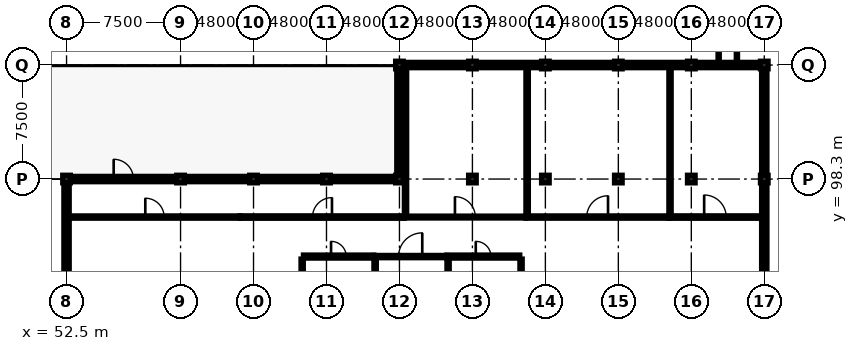
"""IFC4 building model, lengths in metres.
Left out: names, types, materials, properties, quantities, classifications, styles, units other than length and angle.
Written with IfcOpenShell. Run it as: python <this file> out.ifc"""

import sys

from ifc_helpers import new_model, si_unit, direction, frame, frame_2d, origin, origin_2d, place, context, subcontext, project, spatial, rectangle, extrude, element, fill, save


model = new_model("IFC4")
c1 = context("Model", 3, precision=1e-05, world=origin(), true_north=direction((0.0, 1.0)))
c2 = subcontext(c1, "Body", "Model", "MODEL_VIEW")
j1 = project(units=[si_unit("LENGTHUNIT", "METRE"), si_unit("PLANEANGLEUNIT", "RADIAN")], contexts=[c1])
p1 = place(None, origin())
s1 = spatial("IfcSite", under=j1, at=p1, CompositionType="ELEMENT")
p2 = place(p1, origin())
s2 = spatial("IfcBuilding", under=s1, at=p2, CompositionType="ELEMENT")
p3 = place(p2, frame((0.0, 0.0, 13.5)))
s3 = spatial("IfcBuildingStorey", under=s2, at=p3, CompositionType="ELEMENT", Elevation=13.5)
for number, where, z_axis, x_axis in (
    (1, (52.5, 98.3, 0.0), (0.0, 0.0, 1.0), (1.0, 0.0, 0.0)),
    (2, (60.0, 98.3, 0.0), (0.0, 0.0, 1.0), (1.0, 0.0, 0.0)),
    (3, (64.8, 98.3, 0.0), (0.0, 0.0, 1.0), (1.0, 0.0, 0.0)),
    (4, (69.6, 98.3, 0.0), (0.0, 0.0, 1.0), (1.0, 0.0, 0.0)),
):
    element("IfcColumn", number, at=place(p3, frame(where, z_axis=z_axis, x_axis=x_axis)), inside=s3, PredefinedType="COLUMN", context=c2, shape_type="SweptSolid", body=[
        extrude(rectangle(XDim=0.5, YDim=0.5, at=origin_2d()), origin(), (0.0, 0.0, 1.0), 5.029),
    ])
for number, where, z_axis, x_axis in (
    (5, (74.4, 98.3, 0.0), (0.0, 0.0, 1.0), (1.0, 0.0, 0.0)),
    (6, (74.4, 105.8, 0.0), (0.0, 0.0, 1.0), (1.0, 0.0, 0.0)),
    (7, (79.2, 98.3, 0.0), (0.0, 0.0, 1.0), (1.0, 0.0, 0.0)),
    (8, (79.2, 105.8, 0.0), (0.0, 0.0, 1.0), (1.0, 0.0, 0.0)),
    (9, (84.0, 98.3, 0.0), (0.0, 0.0, 1.0), (1.0, 0.0, 0.0)),
    (10, (84.0, 105.8, 0.0), (0.0, 0.0, 1.0), (1.0, 0.0, 0.0)),
    (11, (88.8, 98.3, 0.0), (0.0, 0.0, 1.0), (1.0, 0.0, 0.0)),
    (12, (88.8, 105.8, 0.0), (0.0, 0.0, 1.0), (1.0, 0.0, 0.0)),
    (13, (93.6, 98.3, 0.0), (0.0, 0.0, 1.0), (1.0, 0.0, 0.0)),
    (14, (93.6, 105.8, 0.0), (0.0, 0.0, 1.0), (1.0, 0.0, 0.0)),
    (15, (98.4, 98.3, 0.0), (0.0, 0.0, 1.0), (1.0, 0.0, 0.0)),
    (16, (98.4, 105.8, 0.0), (0.0, 0.0, 1.0), (1.0, 0.0, 0.0)),
):
    element("IfcColumn", number, at=place(p3, frame(where, z_axis=z_axis, x_axis=x_axis)), inside=s3, PredefinedType="COLUMN", context=c2, shape_type="SweptSolid", body=[
        extrude(rectangle(XDim=0.5, YDim=0.5, at=origin_2d()), origin(), (0.0, 0.0, 1.0), 3.8),
    ])
for number, where, z_axis, x_axis in (
    (17, (74.65, 105.8, 0.0), (0.0, 0.0, 1.0), (1.0, 0.0, 0.0)),
    (18, (79.45, 105.8, 0.0), (0.0, 0.0, 1.0), (1.0, 0.0, 0.0)),
):
    element("IfcWall", number, at=place(p3, frame(where, z_axis=z_axis, x_axis=x_axis)), inside=s3, PredefinedType="SOLIDWALL", context=c2, shape_type="SweptSolid", body=[
        extrude(rectangle(XDim=4.3, YDim=0.35, at=frame_2d((2.15, 0.0))), origin(), (0.0, 0.0, 1.0), 3.7),
    ])
p4 = place(p3, frame((84.25, 105.8, 0.0), z_axis=(0.0, 0.0, 1.0), x_axis=(1.0, 0.0, 0.0)))
e19 = element("IfcWall", 19, at=p4, inside=s3, PredefinedType="SOLIDWALL", context=c2, shape_type="SweptSolid", body=[
    extrude(rectangle(XDim=4.3, YDim=0.35, at=frame_2d((2.15, 0.0))), origin(), (0.0, 0.0, 1.0), 3.7),
])
p5 = place(p4, frame((1.25, 0.0, 0.9)))
e20 = element("IfcOpeningElement", 20, at=p5, cuts=e19, PredefinedType="OPENING", context=c2, shape_type="SweptSolid", body=[
    extrude(rectangle(XDim=1.8, YDim=1.9, at=frame_2d((0.9, 0.95))), frame((0.0, 0.187, 0.0), z_axis=(0.0, -1.0, 0.0), x_axis=(1.0, 0.0, 0.0)), (0.0, 0.0, 1.0), 0.374),
])
p6 = place(p3, frame((89.05, 105.8, 0.0), z_axis=(0.0, 0.0, 1.0), x_axis=(1.0, 0.0, 0.0)))
e21 = element("IfcWall", 21, at=p6, inside=s3, PredefinedType="SOLIDWALL", context=c2, shape_type="SweptSolid", body=[
    extrude(rectangle(XDim=4.3, YDim=0.35, at=frame_2d((2.15, 0.0))), origin(), (0.0, 0.0, 1.0), 3.7),
])
p7 = place(p3, frame((93.85, 105.8, 0.0), z_axis=(0.0, 0.0, 1.0), x_axis=(1.0, 0.0, 0.0)))
e22 = element("IfcWall", 22, at=p7, inside=s3, PredefinedType="SOLIDWALL", context=c2, shape_type="SweptSolid", body=[
    extrude(rectangle(XDim=4.3, YDim=0.35, at=frame_2d((2.15, 0.0))), origin(), (0.0, 0.0, 1.0), 3.7),
])
p8 = place(p7, frame((1.15, 0.0, 0.9)))
e23 = element("IfcOpeningElement", 23, at=p8, cuts=e22, PredefinedType="OPENING", context=c2, shape_type="SweptSolid", body=[
    extrude(rectangle(XDim=2.0, YDim=1.3, at=frame_2d((1.0, 0.65))), frame((0.0, 0.187, 0.0), z_axis=(0.0, -1.0, 0.0), x_axis=(1.0, 0.0, 0.0)), (0.0, 0.0, 1.0), 0.374),
])
p9 = place(p3, frame((98.4, 105.55, 0.0), z_axis=(0.0, 0.0, 1.0), x_axis=(0.0, -1.0, 0.0)))
e24 = element("IfcWall", 24, at=p9, inside=s3, PredefinedType="SOLIDWALL", context=c2, shape_type="SweptSolid", body=[
    extrude(rectangle(XDim=7.0, YDim=0.35, at=frame_2d((3.5, 0.0))), origin(), (0.0, 0.0, 1.0), 3.7),
])
p10 = place(p9, frame((2.5, 0.0, 0.9)))
e25 = element("IfcOpeningElement", 25, at=p10, cuts=e24, PredefinedType="OPENING", context=c2, shape_type="SweptSolid", body=[
    extrude(rectangle(XDim=2.0, YDim=1.5, at=frame_2d((1.0, 0.75))), frame((0.0, 0.187, 0.0), z_axis=(0.0, -1.0, 0.0), x_axis=(1.0, 0.0, 0.0)), (0.0, 0.0, 1.0), 0.374),
])
for number, where, z_axis, x_axis in (
    (26, (98.4, 98.05, 0.0), (0.0, 0.0, 1.0), (0.0, -1.0, 0.0)),
    (27, (52.5, 91.05, 0.0), (0.0, 0.0, 1.0), (0.0, 1.0, 0.0)),
):
    element("IfcWall", number, at=place(p3, frame(where, z_axis=z_axis, x_axis=x_axis)), inside=s3, PredefinedType="SOLIDWALL", context=c2, shape_type="SweptSolid", body=[
        extrude(rectangle(XDim=7.0, YDim=0.35, at=frame_2d((3.5, 0.0))), origin(), (0.0, 0.0, 1.0), 3.7),
    ])
p11 = place(p3, frame((52.75, 98.3, 0.0), z_axis=(0.0, 0.0, 1.0), x_axis=(1.0, 0.0, 0.0)))
e28 = element("IfcWall", 28, at=p11, inside=s3, PredefinedType="SOLIDWALL", context=c2, shape_type="SweptSolid", body=[
    extrude(rectangle(XDim=7.0, YDim=0.35, at=frame_2d((3.5, 0.0))), origin(), (0.0, 0.0, 1.0), 3.7),
])
p12 = place(p11, frame((2.85, 0.0, 0.0)))
e29 = element("IfcOpeningElement", 29, at=p12, cuts=e28, PredefinedType="OPENING", context=c2, shape_type="SweptSolid", body=[
    extrude(rectangle(XDim=1.3, YDim=2.2, at=frame_2d((0.65, 1.1))), frame((0.0, 0.187, 0.0), z_axis=(0.0, -1.0, 0.0), x_axis=(1.0, 0.0, 0.0)), (0.0, 0.0, 1.0), 0.374),
])
p13 = place(p3, frame((60.25, 98.3, 0.0), z_axis=(0.0, 0.0, 1.0), x_axis=(1.0, 0.0, 0.0)))
e30 = element("IfcWall", 30, at=p13, inside=s3, PredefinedType="SOLIDWALL", context=c2, shape_type="SweptSolid", body=[
    extrude(rectangle(XDim=4.3, YDim=0.35, at=frame_2d((2.15, 0.0))), origin(), (0.0, 0.0, 1.0), 3.7),
])
p14 = place(p13, frame((0.95, 0.0, 0.9)))
e31 = element("IfcOpeningElement", 31, at=p14, cuts=e30, PredefinedType="OPENING", context=c2, shape_type="SweptSolid", body=[
    extrude(rectangle(XDim=2.4, YDim=1.5, at=frame_2d((1.2, 0.75))), frame((0.0, 0.187, 0.0), z_axis=(0.0, -1.0, 0.0), x_axis=(1.0, 0.0, 0.0)), (0.0, 0.0, 1.0), 0.374),
])
p15 = place(p3, frame((65.05, 98.3, 0.0), z_axis=(0.0, 0.0, 1.0), x_axis=(1.0, 0.0, 0.0)))
e32 = element("IfcWall", 32, at=p15, inside=s3, PredefinedType="SOLIDWALL", context=c2, shape_type="SweptSolid", body=[
    extrude(rectangle(XDim=4.3, YDim=0.35, at=frame_2d((2.15, 0.0))), origin(), (0.0, 0.0, 1.0), 3.7),
])
p16 = place(p15, frame((0.95, 0.0, 0.9)))
e33 = element("IfcOpeningElement", 33, at=p16, cuts=e32, PredefinedType="OPENING", context=c2, shape_type="SweptSolid", body=[
    extrude(rectangle(XDim=2.4, YDim=1.7, at=frame_2d((1.2, 0.85))), frame((0.0, 0.187, 0.0), z_axis=(0.0, -1.0, 0.0), x_axis=(1.0, 0.0, 0.0)), (0.0, 0.0, 1.0), 0.374),
])
p17 = place(p3, frame((69.85, 98.3, 0.0), z_axis=(0.0, 0.0, 1.0), x_axis=(1.0, 0.0, 0.0)))
e34 = element("IfcWall", 34, at=p17, inside=s3, PredefinedType="SOLIDWALL", context=c2, shape_type="SweptSolid", body=[
    extrude(rectangle(XDim=4.3, YDim=0.35, at=frame_2d((2.15, 0.0))), origin(), (0.0, 0.0, 1.0), 3.7),
])
p18 = place(p17, frame((0.95, 0.0, 0.9)))
e35 = element("IfcOpeningElement", 35, at=p18, cuts=e34, PredefinedType="OPENING", context=c2, shape_type="SweptSolid", body=[
    extrude(rectangle(XDim=2.4, YDim=1.9, at=frame_2d((1.2, 0.95))), frame((0.0, 0.187, 0.0), z_axis=(0.0, -1.0, 0.0), x_axis=(1.0, 0.0, 0.0)), (0.0, 0.0, 1.0), 0.374),
])
p19 = place(p3, frame((74.4, 98.55, 0.0), z_axis=(0.0, 0.0, 1.0), x_axis=(0.0, 1.0, 0.0)))
e36 = element("IfcWall", 36, at=p19, inside=s3, PredefinedType="SOLIDWALL", context=c2, shape_type="SweptSolid", body=[
    extrude(rectangle(XDim=7.0, YDim=0.35, at=frame_2d((3.5, 0.0))), origin(), (0.0, 0.0, 1.0), 3.7),
])
p20 = place(p3, frame((52.687, 95.8, 0.0), z_axis=(0.0, 0.0, 1.0), x_axis=(1.0, 0.0, 0.0)))
e37 = element("IfcWall", 37, at=p20, inside=s3, PredefinedType="PARTITIONING", context=c2, shape_type="SweptSolid", body=[
    extrude(rectangle(XDim=11.228, YDim=0.15, at=frame_2d((5.614, 0.0))), origin(), (0.0, 0.0, 1.0), 3.7),
])
p21 = place(p20, frame((4.994, 0.0, 0.0)))
e38 = element("IfcOpeningElement", 38, at=p21, cuts=e37, PredefinedType="OPENING", context=c2, shape_type="SweptSolid", body=[
    extrude(rectangle(XDim=1.24, YDim=2.2, at=frame_2d((0.62, 1.1))), frame((0.0, 0.087, 0.0), z_axis=(0.0, -1.0, 0.0), x_axis=(1.0, 0.0, 0.0)), (0.0, 0.0, 1.0), 0.174),
])
p22 = place(p3, frame((63.927, 95.8, 0.0), z_axis=(0.0, 0.0, 1.0), x_axis=(1.0, 0.0, 0.0)))
e39 = element("IfcWall", 39, at=p22, inside=s3, PredefinedType="PARTITIONING", context=c2, shape_type="SweptSolid", body=[
    extrude(rectangle(XDim=10.788, YDim=0.16, at=frame_2d((5.394, 0.0))), origin(), (0.0, 0.0, 1.0), 3.7),
])
p23 = place(p22, frame((4.754, 0.0, 0.0)))
e40 = element("IfcOpeningElement", 40, at=p23, cuts=e39, PredefinedType="OPENING", context=c2, shape_type="SweptSolid", body=[
    extrude(rectangle(XDim=1.28, YDim=2.22, at=frame_2d((0.64, 1.11))), frame((0.0, 0.092, 0.0), z_axis=(0.0, -1.0, 0.0), x_axis=(1.0, 0.0, 0.0)), (0.0, 0.0, 1.0), 0.184),
])
p24 = place(p3, frame((74.727, 95.8, 0.0), z_axis=(0.0, 0.0, 1.0), x_axis=(1.0, 0.0, 0.0)))
e41 = element("IfcWall", 41, at=p24, inside=s3, PredefinedType="PARTITIONING", context=c2, shape_type="SweptSolid", body=[
    extrude(rectangle(XDim=7.988, YDim=0.125, at=frame_2d((3.994, 0.0))), origin(), (0.0, 0.0, 1.0), 3.7),
])
p25 = place(p24, frame((3.324, 0.0, 0.0)))
e42 = element("IfcOpeningElement", 42, at=p25, cuts=e41, PredefinedType="OPENING", context=c2, shape_type="SweptSolid", body=[
    extrude(rectangle(XDim=1.34, YDim=2.24, at=frame_2d((0.67, 1.12))), frame((0.0, 0.074, 0.0), z_axis=(0.0, -1.0, 0.0), x_axis=(1.0, 0.0, 0.0)), (0.0, 0.0, 1.0), 0.149),
])
p26 = place(p3, frame((82.727, 95.8, 0.0), z_axis=(0.0, 0.0, 1.0), x_axis=(1.0, 0.0, 0.0)))
e43 = element("IfcWall", 43, at=p26, inside=s3, PredefinedType="PARTITIONING", context=c2, shape_type="SweptSolid", body=[
    extrude(rectangle(XDim=9.388, YDim=0.15, at=frame_2d((4.694, 0.0))), origin(), (0.0, 0.0, 1.0), 3.7),
])
p27 = place(p26, frame((3.994, 0.0, 0.0)))
e44 = element("IfcOpeningElement", 44, at=p27, cuts=e43, PredefinedType="OPENING", context=c2, shape_type="SweptSolid", body=[
    extrude(rectangle(XDim=1.4, YDim=2.25, at=frame_2d((0.7, 1.125))), frame((0.0, 0.087, 0.0), z_axis=(0.0, -1.0, 0.0), x_axis=(1.0, 0.0, 0.0)), (0.0, 0.0, 1.0), 0.174),
])
p28 = place(p3, frame((92.127, 95.8, 0.0), z_axis=(0.0, 0.0, 1.0), x_axis=(1.0, 0.0, 0.0)))
e45 = element("IfcWall", 45, at=p28, inside=s3, PredefinedType="PARTITIONING", context=c2, shape_type="SweptSolid", body=[
    extrude(rectangle(XDim=6.086, YDim=0.16, at=frame_2d((3.043, 0.0))), origin(), (0.0, 0.0, 1.0), 3.7),
])
p29 = place(p28, frame((2.318, 0.0, 0.0)))
e46 = element("IfcOpeningElement", 46, at=p29, cuts=e45, PredefinedType="OPENING", context=c2, shape_type="SweptSolid", body=[
    extrude(rectangle(XDim=1.45, YDim=2.26, at=frame_2d((0.725, 1.13))), frame((0.0, 0.092, 0.0), z_axis=(0.0, -1.0, 0.0), x_axis=(1.0, 0.0, 0.0)), (0.0, 0.0, 1.0), 0.184),
])
p30 = place(p3, frame((68.085, 93.2, 0.0), z_axis=(0.0, 0.0, 1.0), x_axis=(1.0, 0.0, 0.0)))
e47 = element("IfcWall", 47, at=p30, inside=s3, PredefinedType="PARTITIONING", context=c2, shape_type="SweptSolid", body=[
    extrude(rectangle(XDim=4.63, YDim=0.2, at=frame_2d((2.315, 0.0))), origin(), (0.0, 0.0, 1.0), 3.7),
])
p31 = place(p30, frame((1.815, 0.0, 0.0)))
e48 = element("IfcOpeningElement", 48, at=p31, cuts=e47, PredefinedType="OPENING", context=c2, shape_type="SweptSolid", body=[
    extrude(rectangle(XDim=1.0, YDim=2.15, at=frame_2d((0.5, 1.075))), frame((0.0, 0.112, 0.0), z_axis=(0.0, -1.0, 0.0), x_axis=(1.0, 0.0, 0.0)), (0.0, 0.0, 1.0), 0.224),
])
p32 = place(p3, frame((72.727, 93.2, 0.0), z_axis=(0.0, 0.0, 1.0), x_axis=(1.0, 0.0, 0.0)))
e49 = element("IfcWall", 49, at=p32, inside=s3, PredefinedType="PARTITIONING", context=c2, shape_type="SweptSolid", body=[
    extrude(rectangle(XDim=4.788, YDim=0.15, at=frame_2d((2.394, 0.0))), origin(), (0.0, 0.0, 1.0), 3.7),
])
p33 = place(p32, frame((1.614, 0.0, 0.0)))
e50 = element("IfcOpeningElement", 50, at=p33, cuts=e49, PredefinedType="OPENING", context=c2, shape_type="SweptSolid", body=[
    extrude(rectangle(XDim=1.56, YDim=2.3, at=frame_2d((0.78, 1.15))), frame((0.0, 0.087, 0.0), z_axis=(0.0, -1.0, 0.0), x_axis=(1.0, 0.0, 0.0)), (0.0, 0.0, 1.0), 0.174),
])
p34 = place(p3, frame((77.527, 93.2, 0.0), z_axis=(0.0, 0.0, 1.0), x_axis=(1.0, 0.0, 0.0)))
e51 = element("IfcWall", 51, at=p34, inside=s3, PredefinedType="PARTITIONING", context=c2, shape_type="SweptSolid", body=[
    extrude(rectangle(XDim=4.788, YDim=0.2, at=frame_2d((2.394, 0.0))), origin(), (0.0, 0.0, 1.0), 3.7),
])
p35 = place(p34, frame((1.894, 0.0, 0.0)))
e52 = element("IfcOpeningElement", 52, at=p35, cuts=e51, PredefinedType="OPENING", context=c2, shape_type="SweptSolid", body=[
    extrude(rectangle(XDim=1.0, YDim=2.15, at=frame_2d((0.5, 1.075))), frame((0.0, 0.112, 0.0), z_axis=(0.0, -1.0, 0.0), x_axis=(1.0, 0.0, 0.0)), (0.0, 0.0, 1.0), 0.224),
])
p36 = place(p3, frame((74.8, 95.875, 0.0), z_axis=(0.0, 0.0, 1.0), x_axis=(0.0, 1.0, 0.0)))
e53 = element("IfcWall", 53, at=p36, inside=s3, PredefinedType="PARTITIONING", context=c2, shape_type="SweptSolid", body=[
    extrude(rectangle(XDim=9.739, YDim=0.15, at=frame_2d((4.869, 0.0))), origin(), (0.0, 0.0, 1.0), 3.7),
])
p37 = place(p3, frame((82.8, 95.887, 0.0), z_axis=(0.0, 0.0, 1.0), x_axis=(0.0, 1.0, 0.0)))
e54 = element("IfcWall", 54, at=p37, inside=s3, PredefinedType="PARTITIONING", context=c2, shape_type="SweptSolid", body=[
    extrude(rectangle(XDim=9.726, YDim=0.16, at=frame_2d((4.863, 0.0))), origin(), (0.0, 0.0, 1.0), 3.7),
])
p38 = place(p3, frame((92.2, 95.892, 0.0), z_axis=(0.0, 0.0, 1.0), x_axis=(0.0, 1.0, 0.0)))
e55 = element("IfcWall", 55, at=p38, inside=s3, PredefinedType="PARTITIONING", context=c2, shape_type="SweptSolid", body=[
    extrude(rectangle(XDim=9.721, YDim=0.15, at=frame_2d((4.86, 0.0))), origin(), (0.0, 0.0, 1.0), 3.7),
])
p39 = place(p3, frame((68.0, 83.487, 0.0), z_axis=(0.0, 0.0, 1.0), x_axis=(0.0, 1.0, 0.0)))
e56 = element("IfcWall", 56, at=p39, inside=s3, PredefinedType="PARTITIONING", context=c2, shape_type="SweptSolid", body=[
    extrude(rectangle(XDim=9.548, YDim=0.15, at=frame_2d((4.774, 0.0))), origin(), (0.0, 0.0, 1.0), 3.7),
])
p40 = place(p3, frame((72.8, 83.487, 0.0), z_axis=(0.0, 0.0, 1.0), x_axis=(0.0, 1.0, 0.0)))
e57 = element("IfcWall", 57, at=p40, inside=s3, PredefinedType="PARTITIONING", context=c2, shape_type="SweptSolid", body=[
    extrude(rectangle(XDim=9.626, YDim=0.16, at=frame_2d((4.813, 0.0))), origin(), (0.0, 0.0, 1.0), 3.7),
])
p41 = place(p3, frame((77.6, 83.487, 0.0), z_axis=(0.0, 0.0, 1.0), x_axis=(0.0, 1.0, 0.0)))
e58 = element("IfcWall", 58, at=p41, inside=s3, PredefinedType="PARTITIONING", context=c2, shape_type="SweptSolid", body=[
    extrude(rectangle(XDim=9.621, YDim=0.15, at=frame_2d((4.811, 0.0))), origin(), (0.0, 0.0, 1.0), 3.7),
])
p42 = place(p3, frame((82.4, 83.487, 0.0), z_axis=(0.0, 0.0, 1.0), x_axis=(0.0, 1.0, 0.0)))
e59 = element("IfcWall", 59, at=p42, inside=s3, PredefinedType="PARTITIONING", context=c2, shape_type="SweptSolid", body=[
    extrude(rectangle(XDim=9.548, YDim=0.15, at=frame_2d((4.774, 0.0))), origin(), (0.0, 0.0, 1.0), 3.7),
])
p43 = place(p5, origin())
e60 = element("IfcWindow", 60, at=p43, inside=s3, PartitioningType="DOUBLE_PANEL_VERTICAL", PredefinedType="WINDOW", context=c2, shape_type="SweptSolid", body=[
    extrude(rectangle(XDim=1.8, YDim=1.9, at=frame_2d((0.9, 0.95))), frame((0.0, 0.03, 0.0), z_axis=(0.0, -1.0, 0.0), x_axis=(1.0, 0.0, 0.0)), (0.0, 0.0, 1.0), 0.06),
])
fill(e20, e60)
p44 = place(p8, origin())
e61 = element("IfcWindow", 61, at=p44, inside=s3, PartitioningType="DOUBLE_PANEL_VERTICAL", PredefinedType="WINDOW", context=c2, shape_type="SweptSolid", body=[
    extrude(rectangle(XDim=2.0, YDim=1.3, at=frame_2d((1.0, 0.65))), frame((0.0, 0.03, 0.0), z_axis=(0.0, -1.0, 0.0), x_axis=(1.0, 0.0, 0.0)), (0.0, 0.0, 1.0), 0.06),
])
fill(e23, e61)
p45 = place(p10, origin())
e62 = element("IfcWindow", 62, at=p45, inside=s3, PartitioningType="DOUBLE_PANEL_VERTICAL", PredefinedType="WINDOW", context=c2, shape_type="SweptSolid", body=[
    extrude(rectangle(XDim=2.0, YDim=1.5, at=frame_2d((1.0, 0.75))), frame((0.0, 0.03, 0.0), z_axis=(0.0, -1.0, 0.0), x_axis=(1.0, 0.0, 0.0)), (0.0, 0.0, 1.0), 0.06),
])
fill(e25, e62)
p46 = place(p12, origin())
e63 = element("IfcDoor", 63, at=p46, inside=s3, OperationType="SINGLE_SWING_LEFT", PredefinedType="DOOR", context=c2, shape_type="SweptSolid", body=[
    extrude(rectangle(XDim=1.3, YDim=2.2, at=frame_2d((0.65, 1.1))), frame((0.0, 0.025, 0.0), z_axis=(0.0, -1.0, 0.0), x_axis=(1.0, 0.0, 0.0)), (0.0, 0.0, 1.0), 0.05),
])
fill(e29, e63)
p47 = place(p14, origin())
e64 = element("IfcWindow", 64, at=p47, inside=s3, PartitioningType="DOUBLE_PANEL_VERTICAL", PredefinedType="WINDOW", context=c2, shape_type="SweptSolid", body=[
    extrude(rectangle(XDim=2.4, YDim=1.5, at=frame_2d((1.2, 0.75))), frame((0.0, 0.03, 0.0), z_axis=(0.0, -1.0, 0.0), x_axis=(1.0, 0.0, 0.0)), (0.0, 0.0, 1.0), 0.06),
])
fill(e31, e64)
p48 = place(p16, origin())
e65 = element("IfcWindow", 65, at=p48, inside=s3, PartitioningType="DOUBLE_PANEL_VERTICAL", PredefinedType="WINDOW", context=c2, shape_type="SweptSolid", body=[
    extrude(rectangle(XDim=2.4, YDim=1.7, at=frame_2d((1.2, 0.85))), frame((0.0, 0.03, 0.0), z_axis=(0.0, -1.0, 0.0), x_axis=(1.0, 0.0, 0.0)), (0.0, 0.0, 1.0), 0.06),
])
fill(e33, e65)
p49 = place(p18, origin())
e66 = element("IfcWindow", 66, at=p49, inside=s3, PartitioningType="DOUBLE_PANEL_VERTICAL", PredefinedType="WINDOW", context=c2, shape_type="SweptSolid", body=[
    extrude(rectangle(XDim=2.4, YDim=1.9, at=frame_2d((1.2, 0.95))), frame((0.0, 0.03, 0.0), z_axis=(0.0, -1.0, 0.0), x_axis=(1.0, 0.0, 0.0)), (0.0, 0.0, 1.0), 0.06),
])
fill(e35, e66)
p50 = place(p21, origin())
e67 = element("IfcDoor", 67, at=p50, inside=s3, OperationType="SINGLE_SWING_LEFT", PredefinedType="DOOR", context=c2, shape_type="SweptSolid", body=[
    extrude(rectangle(XDim=1.24, YDim=2.2, at=frame_2d((0.62, 1.1))), frame((0.0, 0.025, 0.0), z_axis=(0.0, -1.0, 0.0), x_axis=(1.0, 0.0, 0.0)), (0.0, 0.0, 1.0), 0.05),
])
fill(e38, e67)
p51 = place(p23, origin())
e68 = element("IfcDoor", 68, at=p51, inside=s3, OperationType="SINGLE_SWING_RIGHT", PredefinedType="DOOR", context=c2, shape_type="SweptSolid", body=[
    extrude(rectangle(XDim=1.28, YDim=2.22, at=frame_2d((0.64, 1.11))), frame((0.0, 0.025, 0.0), z_axis=(0.0, -1.0, 0.0), x_axis=(1.0, 0.0, 0.0)), (0.0, 0.0, 1.0), 0.05),
])
fill(e40, e68)
p52 = place(p25, origin())
e69 = element("IfcDoor", 69, at=p52, inside=s3, OperationType="SINGLE_SWING_LEFT", PredefinedType="DOOR", context=c2, shape_type="SweptSolid", body=[
    extrude(rectangle(XDim=1.34, YDim=2.24, at=frame_2d((0.67, 1.12))), frame((0.0, 0.025, 0.0), z_axis=(0.0, -1.0, 0.0), x_axis=(1.0, 0.0, 0.0)), (0.0, 0.0, 1.0), 0.05),
])
fill(e42, e69)
p53 = place(p27, origin())
e70 = element("IfcDoor", 70, at=p53, inside=s3, OperationType="SINGLE_SWING_RIGHT", PredefinedType="DOOR", context=c2, shape_type="SweptSolid", body=[
    extrude(rectangle(XDim=1.4, YDim=2.25, at=frame_2d((0.7, 1.125))), frame((0.0, 0.025, 0.0), z_axis=(0.0, -1.0, 0.0), x_axis=(1.0, 0.0, 0.0)), (0.0, 0.0, 1.0), 0.05),
])
fill(e44, e70)
p54 = place(p29, origin())
e71 = element("IfcDoor", 71, at=p54, inside=s3, OperationType="SINGLE_SWING_LEFT", PredefinedType="DOOR", context=c2, shape_type="SweptSolid", body=[
    extrude(rectangle(XDim=1.45, YDim=2.26, at=frame_2d((0.725, 1.13))), frame((0.0, 0.025, 0.0), z_axis=(0.0, -1.0, 0.0), x_axis=(1.0, 0.0, 0.0)), (0.0, 0.0, 1.0), 0.05),
])
fill(e46, e71)
p55 = place(p31, origin())
e72 = element("IfcDoor", 72, at=p55, inside=s3, OperationType="SINGLE_SWING_LEFT", PredefinedType="DOOR", context=c2, shape_type="SweptSolid", body=[
    extrude(rectangle(XDim=1.0, YDim=2.15, at=frame_2d((0.5, 1.075))), frame((0.0, 0.025, 0.0), z_axis=(0.0, -1.0, 0.0), x_axis=(1.0, 0.0, 0.0)), (0.0, 0.0, 1.0), 0.05),
])
fill(e48, e72)
p56 = place(p33, origin())
e73 = element("IfcDoor", 73, at=p56, inside=s3, OperationType="SINGLE_SWING_RIGHT", PredefinedType="DOOR", context=c2, shape_type="SweptSolid", body=[
    extrude(rectangle(XDim=1.56, YDim=2.3, at=frame_2d((0.78, 1.15))), frame((0.0, 0.025, 0.0), z_axis=(0.0, -1.0, 0.0), x_axis=(1.0, 0.0, 0.0)), (0.0, 0.0, 1.0), 0.05),
])
fill(e50, e73)
p57 = place(p35, origin())
e74 = element("IfcDoor", 74, at=p57, inside=s3, OperationType="SINGLE_SWING_LEFT", PredefinedType="DOOR", context=c2, shape_type="SweptSolid", body=[
    extrude(rectangle(XDim=1.0, YDim=2.15, at=frame_2d((0.5, 1.075))), frame((0.0, 0.025, 0.0), z_axis=(0.0, -1.0, 0.0), x_axis=(1.0, 0.0, 0.0)), (0.0, 0.0, 1.0), 0.05),
])
fill(e52, e74)
save(model, sys.argv[1])
